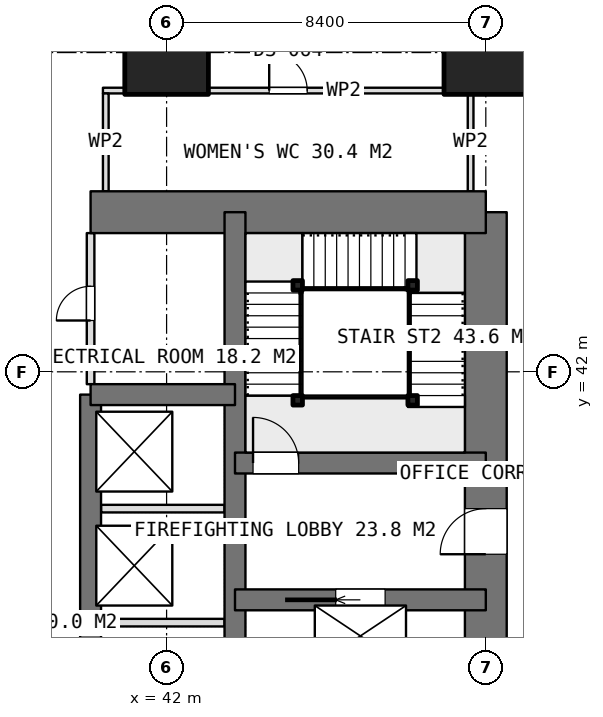
"""IFC4 building model, lengths in metres.
Left out: names, types, materials, properties, quantities, classifications, styles, units other than length and angle.
Written with IfcOpenShell. Run it as: python <this file> out.ifc"""

import sys

from ifc_helpers import new_model, si_unit, direction, frame, frame_2d, origin, origin_2d, place, context, subcontext, project, spatial, rectangle, extrude, element, fill, save


model = new_model("IFC4")
c1 = context("Model", 3, precision=1e-05, world=origin(), true_north=direction((0.0, 1.0)))
c2 = subcontext(c1, "Body", "Model", "MODEL_VIEW")
j1 = project(units=[si_unit("LENGTHUNIT", "METRE"), si_unit("PLANEANGLEUNIT", "RADIAN")], contexts=[c1])
p1 = place(None, origin())
s1 = spatial("IfcSite", under=j1, at=p1, CompositionType="ELEMENT")
p2 = place(p1, origin())
s2 = spatial("IfcBuilding", under=s1, at=p2, CompositionType="ELEMENT")
p3 = place(p2, frame((0.0, 0.0, 55.4)))
s3 = spatial("IfcBuildingStorey", under=s2, at=p3, CompositionType="ELEMENT", Elevation=55.4)
p4 = place(p3, frame((40.0, 46.2, 0.0), z_axis=(0.0, 0.0, 1.0), x_axis=(1.0, 0.0, 0.0)))
e1 = element("IfcWall", 1, at=p4, inside=s3, PredefinedType="SHEAR", context=c2, shape_type="SweptSolid", body=[
    extrude(rectangle(XDim=10.4, YDim=1.1, at=frame_2d((5.2, 0.0))), origin(), (0.0, 0.0, 1.0), 3.75),
])
p5 = place(p3, frame((50.4, 21.0, 0.0), z_axis=(0.0, 0.0, 1.0), x_axis=(0.0, 1.0, 0.0)))
e2 = element("IfcWall", 2, at=p5, inside=s3, PredefinedType="SHEAR", context=c2, shape_type="SweptSolid", body=[
    extrude(rectangle(XDim=25.2, YDim=1.1, at=frame_2d((12.6, 0.0))), origin(), (0.0, 0.0, 1.0), 3.75),
])
p6 = place(p5, frame((16.2, 0.0, 0.0)))
e3 = element("IfcOpeningElement", 3, at=p6, cuts=e2, PredefinedType="OPENING", context=c2, shape_type="SweptSolid", body=[
    extrude(rectangle(XDim=1.2, YDim=2.1, at=frame_2d((0.6, 1.05))), frame((0.0, 0.56, 0.0), z_axis=(0.0, -1.0, 0.0), x_axis=(1.0, 0.0, 0.0)), (0.0, 0.0, 1.0), 1.12),
])
p7 = place(p5, frame((10.05, 0.0, 0.0)))
e4 = element("IfcOpeningElement", 4, at=p7, cuts=e2, PredefinedType="OPENING", context=c2, shape_type="SweptSolid", body=[
    extrude(rectangle(XDim=0.9, YDim=2.1, at=frame_2d((0.45, 1.05))), frame((0.0, 0.56, 0.0), z_axis=(0.0, -1.0, 0.0), x_axis=(1.0, 0.0, 0.0)), (0.0, 0.0, 1.0), 1.12),
])
p8 = place(p5, frame((7.45, 0.0, 0.0)))
e5 = element("IfcOpeningElement", 5, at=p8, cuts=e2, PredefinedType="OPENING", context=c2, shape_type="SweptSolid", body=[
    extrude(rectangle(XDim=0.9, YDim=2.1, at=frame_2d((0.45, 1.05))), frame((0.0, 0.56, 0.0), z_axis=(0.0, -1.0, 0.0), x_axis=(1.0, 0.0, 0.0)), (0.0, 0.0, 1.0), 1.12),
])
p9 = place(p5, frame((0.75, 0.0, 0.0)))
e6 = element("IfcOpeningElement", 6, at=p9, cuts=e2, PredefinedType="OPENING", context=c2, shape_type="SweptSolid", body=[
    extrude(rectangle(XDim=1.2, YDim=2.1, at=frame_2d((0.6, 1.05))), frame((0.0, 0.56, 0.0), z_axis=(0.0, -1.0, 0.0), x_axis=(1.0, 0.0, 0.0)), (0.0, 0.0, 1.0), 1.12),
])
p10 = place(p3, frame((43.8, 21.0, 0.0), z_axis=(0.0, 0.0, 1.0), x_axis=(0.0, 1.0, 0.0)))
e7 = element("IfcWall", 7, at=p10, inside=s3, PredefinedType="SHEAR", context=c2, shape_type="SweptSolid", body=[
    extrude(rectangle(XDim=25.2, YDim=0.55, at=frame_2d((12.6, 0.0))), origin(), (0.0, 0.0, 1.0), 3.75),
])
p11 = place(p3, frame((40.0, 23.4, 0.0), z_axis=(0.0, 0.0, 1.0), x_axis=(0.0, 1.0, 0.0)))
e8 = element("IfcWall", 8, at=p11, inside=s3, PredefinedType="SHEAR", context=c2, shape_type="SweptSolid", body=[
    extrude(rectangle(XDim=18.0, YDim=0.55, at=frame_2d((9.0, 0.0))), origin(), (0.0, 0.0, 1.0), 3.75),
])
p12 = place(p3, frame((40.0, 41.4, 0.0), z_axis=(0.0, 0.0, 1.0), x_axis=(1.0, 0.0, 0.0)))
e9 = element("IfcWall", 9, at=p12, inside=s3, PredefinedType="SHEAR", context=c2, shape_type="SweptSolid", body=[
    extrude(rectangle(XDim=3.8, YDim=0.55, at=frame_2d((1.9, 0.0))), origin(), (0.0, 0.0, 1.0), 3.75),
])
p13 = place(p3, frame((43.8, 36.0, 0.0), z_axis=(0.0, 0.0, 1.0), x_axis=(1.0, 0.0, 0.0)))
e10 = element("IfcWall", 10, at=p13, inside=s3, PredefinedType="SHEAR", context=c2, shape_type="SweptSolid", body=[
    extrude(rectangle(XDim=6.6, YDim=0.55, at=frame_2d((3.3, 0.0))), origin(), (0.0, 0.0, 1.0), 3.75),
])
p14 = place(p13, frame((2.65, 0.0, 0.0)))
e11 = element("IfcOpeningElement", 11, at=p14, cuts=e10, PredefinedType="OPENING", context=c2, shape_type="SweptSolid", body=[
    extrude(rectangle(XDim=1.3, YDim=2.1, at=frame_2d((0.65, 1.05))), frame((0.0, 0.285, 0.0), z_axis=(0.0, -1.0, 0.0), x_axis=(1.0, 0.0, 0.0)), (0.0, 0.0, 1.0), 0.57),
])
p15 = place(p3, frame((43.8, 39.6, 0.0), z_axis=(0.0, 0.0, 1.0), x_axis=(1.0, 0.0, 0.0)))
e12 = element("IfcWall", 12, at=p15, inside=s3, PredefinedType="SHEAR", context=c2, shape_type="SweptSolid", body=[
    extrude(rectangle(XDim=6.6, YDim=0.55, at=frame_2d((3.3, 0.0))), origin(), (0.0, 0.0, 1.0), 3.75),
])
p16 = place(p15, frame((0.475, 0.0, 0.0)))
e13 = element("IfcOpeningElement", 13, at=p16, cuts=e12, PredefinedType="OPENING", context=c2, shape_type="SweptSolid", body=[
    extrude(rectangle(XDim=1.2, YDim=2.1, at=frame_2d((0.6, 1.05))), frame((0.0, 0.285, 0.0), z_axis=(0.0, -1.0, 0.0), x_axis=(1.0, 0.0, 0.0)), (0.0, 0.0, 1.0), 0.57),
])
for number, where, z_axis, x_axis in (
    (14, (42.0, 50.4, 0.0), (0.0, 0.0, 1.0), (1.0, 0.0, 0.0)),
    (15, (50.4, 50.4, 0.0), (0.0, 0.0, 1.0), (1.0, 0.0, 0.0)),
):
    element("IfcColumn", number, at=place(p3, frame(where, z_axis=z_axis, x_axis=x_axis)), inside=s3, PredefinedType="COLUMN", context=c2, shape_type="SweptSolid", body=[
        extrude(rectangle(XDim=2.2, YDim=2.2, at=origin_2d()), origin(), (0.0, 0.0, 1.0), 3.75),
    ])
for number, where, z_axis, x_axis in (
    (16, (40.275, 35.4, 0.0), (0.0, 0.0, 1.0), (1.0, 0.0, 0.0)),
    (17, (40.275, 38.4, 0.0), (0.0, 0.0, 1.0), (1.0, 0.0, 0.0)),
):
    element("IfcWall", number, at=place(p3, frame(where, z_axis=z_axis, x_axis=x_axis)), inside=s3, PredefinedType="PARTITIONING", context=c2, shape_type="SweptSolid", body=[
        extrude(rectangle(XDim=3.25, YDim=0.2, at=frame_2d((1.625, 0.0))), origin(), (0.0, 0.0, 1.0), 3.5),
    ])
p17 = place(p3, frame((40.0, 41.675, 0.0), z_axis=(0.0, 0.0, 1.0), x_axis=(0.0, 1.0, 0.0)))
e18 = element("IfcWall", 18, at=p17, inside=s3, PredefinedType="PARTITIONING", context=c2, shape_type="SweptSolid", body=[
    extrude(rectangle(XDim=3.975, YDim=0.2, at=frame_2d((1.987, 0.0))), origin(), (0.0, 0.0, 1.0), 3.5),
])
p18 = place(p17, frame((1.675, 0.0, 0.0)))
e19 = element("IfcOpeningElement", 19, at=p18, cuts=e18, PredefinedType="OPENING", context=c2, shape_type="SweptSolid", body=[
    extrude(rectangle(XDim=0.9, YDim=2.1, at=frame_2d((0.45, 1.05))), frame((0.0, 0.11, 0.0), z_axis=(0.0, -1.0, 0.0), x_axis=(1.0, 0.0, 0.0)), (0.0, 0.0, 1.0), 0.22),
])
p19 = place(p3, frame((40.325, 49.4, 0.0), z_axis=(0.0, 0.0, 1.0), x_axis=(1.0, 0.0, 0.0)))
e20 = element("IfcWall", 20, at=p19, inside=s3, PredefinedType="PARTITIONING", context=c2, shape_type="SweptSolid", body=[
    extrude(rectangle(XDim=9.75, YDim=0.15, at=frame_2d((4.875, 0.0))), origin(), (0.0, 0.0, 1.0), 3.5),
])
p20 = place(p19, frame((4.375, 0.0, 0.0)))
e21 = element("IfcOpeningElement", 21, at=p20, cuts=e20, PredefinedType="OPENING", context=c2, shape_type="SweptSolid", body=[
    extrude(rectangle(XDim=1.0, YDim=2.1, at=frame_2d((0.5, 1.05))), frame((0.0, 0.085, 0.0), z_axis=(0.0, -1.0, 0.0), x_axis=(1.0, 0.0, 0.0)), (0.0, 0.0, 1.0), 0.17),
])
for number, where, z_axis, x_axis in (
    (22, (40.4, 46.75, 0.0), (0.0, 0.0, 1.0), (0.0, 1.0, 0.0)),
    (23, (50.0, 46.75, 0.0), (0.0, 0.0, 1.0), (0.0, 1.0, 0.0)),
):
    element("IfcWall", number, at=place(p3, frame(where, z_axis=z_axis, x_axis=x_axis)), inside=s3, PredefinedType="PARTITIONING", context=c2, shape_type="SweptSolid", body=[
        extrude(rectangle(XDim=2.575, YDim=0.15, at=frame_2d((1.288, 0.0))), origin(), (0.0, 0.0, 1.0), 3.5),
    ])
for number, where, z_axis, x_axis in (
    (24, (45.45, 41.25, 0.0), (0.0, 0.0, 1.0), (1.0, 0.0, 0.0)),
    (25, (45.45, 44.275, 0.0), (0.0, 0.0, 1.0), (1.0, 0.0, 0.0)),
    (26, (48.475, 44.275, 0.0), (0.0, 0.0, 1.0), (1.0, 0.0, 0.0)),
    (27, (48.475, 41.25, 0.0), (0.0, 0.0, 1.0), (1.0, 0.0, 0.0)),
):
    element("IfcColumn", number, at=place(p3, frame(where, z_axis=z_axis, x_axis=x_axis)), inside=s3, PredefinedType="COLUMN", context=c2, shape_type="SweptSolid", body=[
        extrude(rectangle(XDim=0.25, YDim=0.25, at=origin_2d()), origin(), (0.0, 0.0, 1.0), 3.75),
    ])
p21 = place(p6, origin())
e28 = element("IfcDoor", 28, at=p21, inside=s3, OperationType="SINGLE_SWING_LEFT", PredefinedType="DOOR", context=c2, shape_type="SweptSolid", body=[
    extrude(rectangle(XDim=1.2, YDim=2.1, at=frame_2d((0.6, 1.05))), frame((0.0, 0.025, 0.0), z_axis=(0.0, -1.0, 0.0), x_axis=(1.0, 0.0, 0.0)), (0.0, 0.0, 1.0), 0.05),
])
fill(e3, e28)
p22 = place(p18, origin())
e29 = element("IfcDoor", 29, at=p22, inside=s3, OperationType="SINGLE_SWING_LEFT", PredefinedType="DOOR", context=c2, shape_type="SweptSolid", body=[
    extrude(rectangle(XDim=0.9, YDim=2.1, at=frame_2d((0.45, 1.05))), frame((0.0, 0.025, 0.0), z_axis=(0.0, -1.0, 0.0), x_axis=(1.0, 0.0, 0.0)), (0.0, 0.0, 1.0), 0.05),
])
fill(e19, e29)
p23 = place(p14, origin())
e30 = element("IfcDoor", 30, at=p23, inside=s3, OperationType="SLIDING_TO_LEFT", PredefinedType="USERDEFINED", context=c2, shape_type="SweptSolid", body=[
    extrude(rectangle(XDim=1.3, YDim=2.1, at=frame_2d((0.65, 1.05))), frame((0.0, 0.025, 0.0), z_axis=(0.0, -1.0, 0.0), x_axis=(1.0, 0.0, 0.0)), (0.0, 0.0, 1.0), 0.05),
])
fill(e11, e30)
p24 = place(p20, origin())
e31 = element("IfcDoor", 31, at=p24, inside=s3, OperationType="SINGLE_SWING_LEFT", PredefinedType="DOOR", context=c2, shape_type="SweptSolid", body=[
    extrude(rectangle(XDim=1.0, YDim=2.1, at=frame_2d((0.5, 1.05))), frame((0.0, 0.025, 0.0), z_axis=(0.0, -1.0, 0.0), x_axis=(1.0, 0.0, 0.0)), (0.0, 0.0, 1.0), 0.05),
])
fill(e21, e31)
p25 = place(p16, origin())
e32 = element("IfcDoor", 32, at=p25, inside=s3, OperationType="SINGLE_SWING_RIGHT", PredefinedType="DOOR", context=c2, shape_type="SweptSolid", body=[
    extrude(rectangle(XDim=1.2, YDim=2.1, at=frame_2d((0.6, 1.05))), frame((0.0, 0.025, 0.0), z_axis=(0.0, -1.0, 0.0), x_axis=(1.0, 0.0, 0.0)), (0.0, 0.0, 1.0), 0.05),
])
fill(e13, e32)
save(model, sys.argv[1])
